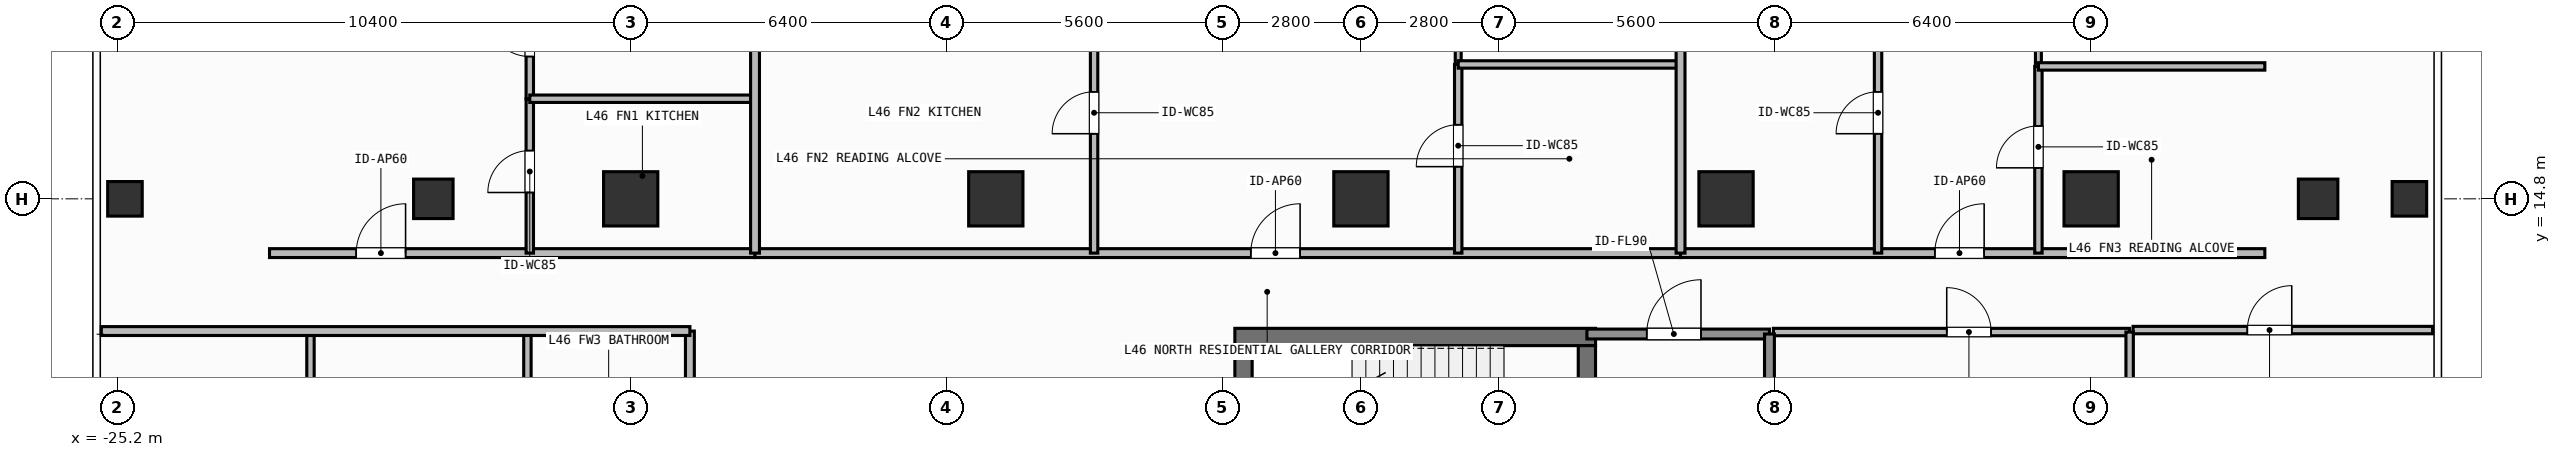
"""IFC4 building model, lengths in metres.
Left out: names, types, materials, properties, quantities, classifications, styles, units other than length and angle.
Written with IfcOpenShell. Run it as: python <this file> out.ifc"""

import sys

from ifc_helpers import new_model, si_unit, direction, frame, frame_2d, origin, origin_2d, place, context, subcontext, project, spatial, rectangle, hollow_rectangle, extrude, element, fill, save


model = new_model("IFC4")
c1 = context("Model", 3, precision=1e-05, world=origin(), true_north=direction((0.0, 1.0)))
c2 = subcontext(c1, "Body", "Model", "MODEL_VIEW")
j1 = project(units=[si_unit("LENGTHUNIT", "METRE"), si_unit("PLANEANGLEUNIT", "RADIAN")], contexts=[c1])
p1 = place(None, origin())
s1 = spatial("IfcSite", under=j1, at=p1, CompositionType="ELEMENT")
p2 = place(p1, origin())
s2 = spatial("IfcBuilding", under=s1, at=p2, CompositionType="ELEMENT")
p3 = place(p2, frame((0.0, 0.0, 187.5)))
s3 = spatial("IfcBuildingStorey", under=s2, at=p3, CompositionType="ELEMENT", Elevation=187.5)
p4 = place(p3, frame((-2.555, 12.0, 0.0), z_axis=(0.0, 0.0, 1.0), x_axis=(1.0, 0.0, 0.0)))
e1 = element("IfcWall", 1, at=p4, inside=s3, PredefinedType="SHEAR", context=c2, shape_type="SweptSolid", body=[
    extrude(rectangle(XDim=7.31, YDim=0.35, at=frame_2d((3.655, 0.0))), origin(), (0.0, 0.0, 1.0), 3.9),
])
p5 = place(p3, frame((-2.38, 8.9, 0.0), z_axis=(0.0, 0.0, 1.0), x_axis=(0.0, 1.0, 0.0)))
e2 = element("IfcWall", 2, at=p5, inside=s3, PredefinedType="SHEAR", context=c2, shape_type="SweptSolid", body=[
    extrude(rectangle(XDim=2.925, YDim=0.35, at=frame_2d((1.462, 0.0))), origin(), (0.0, 0.0, 1.0), 3.9),
])
p6 = place(p3, frame((4.58, 11.825, 0.0), z_axis=(0.0, 0.0, 1.0), x_axis=(0.0, -1.0, 0.0)))
e3 = element("IfcWall", 3, at=p6, inside=s3, PredefinedType="SHEAR", context=c2, shape_type="SweptSolid", body=[
    extrude(rectangle(XDim=2.925, YDim=0.35, at=frame_2d((1.462, 0.0))), origin(), (0.0, 0.0, 1.0), 3.9),
])
p7 = place(p6, frame((0.913, 0.0, 0.0)))
e4 = element("IfcOpeningElement", 4, at=p7, cuts=e3, PredefinedType="OPENING", context=c2, shape_type="SweptSolid", body=[
    extrude(rectangle(XDim=1.1, YDim=2.15, at=frame_2d((0.55, 1.075))), frame((0.0, 0.185, 0.0), z_axis=(0.0, -1.0, 0.0), x_axis=(1.0, 0.0, 0.0)), (0.0, 0.0, 1.0), 0.37),
])
for number, where, z_axis, x_axis in (
    (5, (-14.8, 14.8, 0.0), (0.0, 0.0, 1.0), (1.0, 0.0, 0.0)),
    (6, (-7.4, 14.8, 0.0), (0.0, 0.0, 1.0), (1.0, 0.0, 0.0)),
    (7, (0.0, 14.8, 0.0), (0.0, 0.0, 1.0), (1.0, 0.0, 0.0)),
    (8, (7.4, 14.8, 0.0), (0.0, 0.0, 1.0), (1.0, 0.0, 0.0)),
    (9, (14.8, 14.8, 0.0), (0.0, 0.0, 1.0), (1.0, 0.0, 0.0)),
):
    element("IfcColumn", number, at=place(p3, frame(where, z_axis=z_axis, x_axis=x_axis)), inside=s3, PredefinedType="COLUMN", context=c2, shape_type="SweptSolid", body=[
        extrude(rectangle(XDim=1.1, YDim=1.1, at=origin_2d()), origin(), (0.0, 0.0, 1.0), 3.9),
    ])
for number, where, z_axis, x_axis in (
    (10, (-18.8, 14.8, 0.0), (0.0, 0.0, 1.0), (1.0, 0.0, 0.0)),
    (11, (19.4, 14.8, 0.0), (0.0, 0.0, 1.0), (1.0, 0.0, 0.0)),
):
    element("IfcColumn", number, at=place(p3, frame(where, z_axis=z_axis, x_axis=x_axis)), inside=s3, PredefinedType="COLUMN", context=c2, shape_type="SweptSolid", body=[
        extrude(hollow_rectangle(XDim=0.8, YDim=0.8, WallThickness=0.036, at=origin_2d()), origin(), (0.0, 0.0, 1.0), 3.9),
    ])
for number, where, z_axis, x_axis in (
    (12, (-25.05, 14.8, 0.0), (0.0, 0.0, 1.0), (1.0, 0.0, 0.0)),
    (13, (21.25, 14.8, 0.0), (0.0, 0.0, 1.0), (1.0, 0.0, 0.0)),
):
    element("IfcColumn", number, at=place(p3, frame(where, z_axis=z_axis, x_axis=x_axis)), inside=s3, PredefinedType="COLUMN", context=c2, shape_type="SweptSolid", body=[
        extrude(hollow_rectangle(XDim=0.7, YDim=0.7, WallThickness=0.032, at=origin_2d()), origin(), (0.0, 0.0, 1.0), 3.9),
    ])
p8 = place(p3, frame((4.58, 12.06, 0.0), z_axis=(0.0, 0.0, 1.0), x_axis=(1.0, 0.0, 0.0)))
e14 = element("IfcWall", 14, at=p8, inside=s3, PredefinedType="SOLIDWALL", context=c2, shape_type="SweptSolid", body=[
    extrude(rectangle(XDim=3.7, YDim=0.2, at=frame_2d((1.85, 0.0))), origin(), (0.0, 0.0, 1.0), 3.62),
])
p9 = place(p8, frame((1.212, 0.0, 0.0)))
e15 = element("IfcOpeningElement", 15, at=p9, cuts=e14, PredefinedType="OPENING", context=c2, shape_type="SweptSolid", body=[
    extrude(rectangle(XDim=1.1, YDim=2.15, at=frame_2d((0.55, 1.075))), frame((0.0, 0.11, 0.0), z_axis=(0.0, -1.0, 0.0), x_axis=(1.0, 0.0, 0.0)), (0.0, 0.0, 1.0), 0.22),
])
p10 = place(p3, frame((8.36, 12.1, 0.0), z_axis=(0.0, 0.0, 1.0), x_axis=(1.0, 0.0, 0.0)))
e16 = element("IfcWall", 16, at=p10, inside=s3, PredefinedType="PARTITIONING", context=c2, shape_type="SweptSolid", body=[
    extrude(rectangle(XDim=7.22, YDim=0.15, at=frame_2d((3.61, 0.0))), origin(), (0.0, 0.0, 1.0), 3.62),
])
p11 = place(p10, frame((3.513, 0.0, 0.0)))
e17 = element("IfcOpeningElement", 17, at=p11, cuts=e16, PredefinedType="OPENING", context=c2, shape_type="SweptSolid", body=[
    extrude(rectangle(XDim=0.9, YDim=2.1, at=frame_2d((0.45, 1.05))), frame((0.0, 0.085, 0.0), z_axis=(0.0, -1.0, 0.0), x_axis=(1.0, 0.0, 0.0)), (0.0, 0.0, 1.0), 0.17),
])
p12 = place(p3, frame((-22.12, 13.7, 0.0), z_axis=(0.0, 0.0, 1.0), x_axis=(1.0, 0.0, 0.0)))
e18 = element("IfcWall", 18, at=p12, inside=s3, PredefinedType="PARTITIONING", context=c2, shape_type="SweptSolid", body=[
    extrude(rectangle(XDim=9.84, YDim=0.18, at=frame_2d((4.92, 0.0))), origin(), (0.0, 0.0, 1.0), 3.62),
])
p13 = place(p12, frame((1.758, 0.0, 0.0)))
e19 = element("IfcOpeningElement", 19, at=p13, cuts=e18, PredefinedType="OPENING", context=c2, shape_type="SweptSolid", body=[
    extrude(rectangle(XDim=1.0, YDim=2.2, at=frame_2d((0.5, 1.1))), frame((0.0, 0.1, 0.0), z_axis=(0.0, -1.0, 0.0), x_axis=(1.0, 0.0, 0.0)), (0.0, 0.0, 1.0), 0.2),
])
p14 = place(p3, frame((-16.845, 13.7, 0.0), z_axis=(0.0, 0.0, 1.0), x_axis=(0.0, 1.0, 0.0)))
e20 = element("IfcWall", 20, at=p14, inside=s3, PredefinedType="PARTITIONING", context=c2, shape_type="SweptSolid", body=[
    extrude(rectangle(XDim=3.129, YDim=0.15, at=frame_2d((1.564, 0.0))), origin(), (0.0, 0.0, 1.0), 3.62),
])
p15 = place(p14, frame((1.229, 0.0, 0.0)))
e21 = element("IfcOpeningElement", 21, at=p15, cuts=e20, PredefinedType="OPENING", context=c2, shape_type="SweptSolid", body=[
    extrude(rectangle(XDim=0.85, YDim=2.1, at=frame_2d((0.425, 1.05))), frame((0.0, 0.085, 0.0), z_axis=(0.0, -1.0, 0.0), x_axis=(1.0, 0.0, 0.0)), (0.0, 0.0, 1.0), 0.17),
])
p16 = place(p3, frame((-16.845, 16.829, 0.0), z_axis=(0.0, 0.0, 1.0), x_axis=(0.0, 1.0, 0.0)))
e22 = element("IfcWall", 22, at=p16, inside=s3, PredefinedType="PARTITIONING", context=c2, shape_type="SweptSolid", body=[
    extrude(rectangle(XDim=2.561, YDim=0.15, at=frame_2d((1.28, 0.0))), origin(), (0.0, 0.0, 1.0), 3.62),
])
p17 = place(p16, frame((0.855, 0.0, 0.0)))
e23 = element("IfcOpeningElement", 23, at=p17, cuts=e22, PredefinedType="OPENING", context=c2, shape_type="SweptSolid", body=[
    extrude(rectangle(XDim=0.85, YDim=2.1, at=frame_2d((0.425, 1.05))), frame((0.0, 0.085, 0.0), z_axis=(0.0, -1.0, 0.0), x_axis=(1.0, 0.0, 0.0)), (0.0, 0.0, 1.0), 0.17),
])
p18 = place(p3, frame((-12.28, 13.7, 0.0), z_axis=(0.0, 0.0, 1.0), x_axis=(1.0, 0.0, 0.0)))
e24 = element("IfcWall", 24, at=p18, inside=s3, PredefinedType="PARTITIONING", context=c2, shape_type="SweptSolid", body=[
    extrude(rectangle(XDim=18.758, YDim=0.18, at=frame_2d((9.379, 0.0))), origin(), (0.0, 0.0, 1.0), 3.62),
])
p19 = place(p18, frame((10.048, 0.0, 0.0)))
e25 = element("IfcOpeningElement", 25, at=p19, cuts=e24, PredefinedType="OPENING", context=c2, shape_type="SweptSolid", body=[
    extrude(rectangle(XDim=1.0, YDim=2.2, at=frame_2d((0.5, 1.1))), frame((0.0, 0.1, 0.0), z_axis=(0.0, -1.0, 0.0), x_axis=(1.0, 0.0, 0.0)), (0.0, 0.0, 1.0), 0.2),
])
p20 = place(p3, frame((-5.408, 13.7, 0.0), z_axis=(0.0, 0.0, 1.0), x_axis=(0.0, 1.0, 0.0)))
e26 = element("IfcWall", 26, at=p20, inside=s3, PredefinedType="PARTITIONING", context=c2, shape_type="SweptSolid", body=[
    extrude(rectangle(XDim=5.69, YDim=0.15, at=frame_2d((2.845, 0.0))), origin(), (0.0, 0.0, 1.0), 3.62),
])
p21 = place(p20, frame((2.42, 0.0, 0.0)))
e27 = element("IfcOpeningElement", 27, at=p21, cuts=e26, PredefinedType="OPENING", context=c2, shape_type="SweptSolid", body=[
    extrude(rectangle(XDim=0.85, YDim=2.1, at=frame_2d((0.425, 1.05))), frame((0.0, 0.085, 0.0), z_axis=(0.0, -1.0, 0.0), x_axis=(1.0, 0.0, 0.0)), (0.0, 0.0, 1.0), 0.17),
])
p22 = place(p3, frame((1.972, 13.7, 0.0), z_axis=(0.0, 0.0, 1.0), x_axis=(0.0, 1.0, 0.0)))
e28 = element("IfcWall", 28, at=p22, inside=s3, PredefinedType="PARTITIONING", context=c2, shape_type="SweptSolid", body=[
    extrude(rectangle(XDim=3.824, YDim=0.15, at=frame_2d((1.912, 0.0))), origin(), (0.0, 0.0, 1.0), 3.62),
])
p23 = place(p22, frame((1.752, 0.0, 0.0)))
e29 = element("IfcOpeningElement", 29, at=p23, cuts=e28, PredefinedType="OPENING", context=c2, shape_type="SweptSolid", body=[
    extrude(rectangle(XDim=0.85, YDim=2.1, at=frame_2d((0.425, 1.05))), frame((0.0, 0.085, 0.0), z_axis=(0.0, -1.0, 0.0), x_axis=(1.0, 0.0, 0.0)), (0.0, 0.0, 1.0), 0.17),
])
p24 = place(p3, frame((1.972, 17.524, 0.0), z_axis=(0.0, 0.0, 1.0), x_axis=(0.0, 1.0, 0.0)))
e30 = element("IfcWall", 30, at=p24, inside=s3, PredefinedType="PARTITIONING", context=c2, shape_type="SweptSolid", body=[
    extrude(rectangle(XDim=1.866, YDim=0.12, at=frame_2d((0.933, 0.0))), origin(), (0.0, 0.0, 1.0), 3.62),
])
p25 = place(p24, frame((0.508, 0.0, 0.0)))
e31 = element("IfcOpeningElement", 31, at=p25, cuts=e30, PredefinedType="OPENING", context=c2, shape_type="SweptSolid", body=[
    extrude(rectangle(XDim=0.85, YDim=2.1, at=frame_2d((0.425, 1.05))), frame((0.0, 0.07, 0.0), z_axis=(0.0, -1.0, 0.0), x_axis=(1.0, 0.0, 0.0)), (0.0, 0.0, 1.0), 0.14),
])
p26 = place(p3, frame((6.478, 13.7, 0.0), z_axis=(0.0, 0.0, 1.0), x_axis=(1.0, 0.0, 0.0)))
e32 = element("IfcWall", 32, at=p26, inside=s3, PredefinedType="PARTITIONING", context=c2, shape_type="SweptSolid", body=[
    extrude(rectangle(XDim=11.842, YDim=0.18, at=frame_2d((5.921, 0.0))), origin(), (0.0, 0.0, 1.0), 3.62),
])
p27 = place(p26, frame((5.154, 0.0, 0.0)))
e33 = element("IfcOpeningElement", 33, at=p27, cuts=e32, PredefinedType="OPENING", context=c2, shape_type="SweptSolid", body=[
    extrude(rectangle(XDim=1.0, YDim=2.2, at=frame_2d((0.5, 1.1))), frame((0.0, 0.1, 0.0), z_axis=(0.0, -1.0, 0.0), x_axis=(1.0, 0.0, 0.0)), (0.0, 0.0, 1.0), 0.2),
])
p28 = place(p3, frame((10.481, 13.7, 0.0), z_axis=(0.0, 0.0, 1.0), x_axis=(0.0, 1.0, 0.0)))
e34 = element("IfcWall", 34, at=p28, inside=s3, PredefinedType="PARTITIONING", context=c2, shape_type="SweptSolid", body=[
    extrude(rectangle(XDim=5.69, YDim=0.15, at=frame_2d((2.845, 0.0))), origin(), (0.0, 0.0, 1.0), 3.62),
])
p29 = place(p28, frame((2.42, 0.0, 0.0)))
e35 = element("IfcOpeningElement", 35, at=p29, cuts=e34, PredefinedType="OPENING", context=c2, shape_type="SweptSolid", body=[
    extrude(rectangle(XDim=0.85, YDim=2.1, at=frame_2d((0.425, 1.05))), frame((0.0, 0.085, 0.0), z_axis=(0.0, -1.0, 0.0), x_axis=(1.0, 0.0, 0.0)), (0.0, 0.0, 1.0), 0.17),
])
p30 = place(p3, frame((13.731, 13.7, 0.0), z_axis=(0.0, 0.0, 1.0), x_axis=(0.0, 1.0, 0.0)))
e36 = element("IfcWall", 36, at=p30, inside=s3, PredefinedType="PARTITIONING", context=c2, shape_type="SweptSolid", body=[
    extrude(rectangle(XDim=3.784, YDim=0.15, at=frame_2d((1.892, 0.0))), origin(), (0.0, 0.0, 1.0), 3.62),
])
p31 = place(p30, frame((1.729, 0.0, 0.0)))
e37 = element("IfcOpeningElement", 37, at=p31, cuts=e36, PredefinedType="OPENING", context=c2, shape_type="SweptSolid", body=[
    extrude(rectangle(XDim=0.85, YDim=2.1, at=frame_2d((0.425, 1.05))), frame((0.0, 0.085, 0.0), z_axis=(0.0, -1.0, 0.0), x_axis=(1.0, 0.0, 0.0)), (0.0, 0.0, 1.0), 0.17),
])
p32 = place(p3, frame((13.731, 17.484, 0.0), z_axis=(0.0, 0.0, 1.0), x_axis=(0.0, 1.0, 0.0)))
e38 = element("IfcWall", 38, at=p32, inside=s3, PredefinedType="PARTITIONING", context=c2, shape_type="SweptSolid", body=[
    extrude(rectangle(XDim=1.906, YDim=0.12, at=frame_2d((0.953, 0.0))), origin(), (0.0, 0.0, 1.0), 3.62),
])
p33 = place(p32, frame((0.602, 0.0, 0.0)))
e39 = element("IfcOpeningElement", 39, at=p33, cuts=e38, PredefinedType="OPENING", context=c2, shape_type="SweptSolid", body=[
    extrude(rectangle(XDim=0.85, YDim=2.1, at=frame_2d((0.425, 1.05))), frame((0.0, 0.07, 0.0), z_axis=(0.0, -1.0, 0.0), x_axis=(1.0, 0.0, 0.0)), (0.0, 0.0, 1.0), 0.14),
])
p34 = place(p3, frame((-13.6, 4.04, 0.0), z_axis=(0.0, 0.0, 1.0), x_axis=(0.0, 1.0, 0.0)))
e40 = element("IfcWall", 40, at=p34, inside=s3, PredefinedType="PARTITIONING", context=c2, shape_type="SweptSolid", body=[
    extrude(rectangle(XDim=8.08, YDim=0.18, at=frame_2d((4.04, 0.0))), origin(), (0.0, 0.0, 1.0), 3.62),
])
p35 = place(p34, frame((1.761, 0.0, 0.0)))
e41 = element("IfcOpeningElement", 41, at=p35, cuts=e40, PredefinedType="OPENING", context=c2, shape_type="SweptSolid", body=[
    extrude(rectangle(XDim=1.0, YDim=2.2, at=frame_2d((0.5, 1.1))), frame((0.0, 0.1, 0.0), z_axis=(0.0, -1.0, 0.0), x_axis=(1.0, 0.0, 0.0)), (0.0, 0.0, 1.0), 0.2),
])
p36 = place(p3, frame((15.65, 12.14, 0.0), z_axis=(0.0, 0.0, 1.0), x_axis=(1.0, 0.0, 0.0)))
e42 = element("IfcWall", 42, at=p36, inside=s3, PredefinedType="PARTITIONING", context=c2, shape_type="SweptSolid", body=[
    extrude(rectangle(XDim=6.07, YDim=0.15, at=frame_2d((3.035, 0.0))), origin(), (0.0, 0.0, 1.0), 3.62),
])
p37 = place(p36, frame((2.316, 0.0, 0.0)))
e43 = element("IfcOpeningElement", 43, at=p37, cuts=e42, PredefinedType="OPENING", context=c2, shape_type="SweptSolid", body=[
    extrude(rectangle(XDim=0.9, YDim=2.1, at=frame_2d((0.45, 1.05))), frame((0.0, 0.085, 0.0), z_axis=(0.0, -1.0, 0.0), x_axis=(1.0, 0.0, 0.0)), (0.0, 0.0, 1.0), 0.17),
])
p38 = place(p3, frame((8.28, 8.8, 0.0), z_axis=(0.0, 0.0, 1.0), x_axis=(0.0, 1.0, 0.0)))
e44 = element("IfcWall", 44, at=p38, inside=s3, PredefinedType="SOLIDWALL", context=c2, shape_type="SweptSolid", body=[
    extrude(rectangle(XDim=3.26, YDim=0.2, at=frame_2d((1.63, 0.0))), origin(), (0.0, 0.0, 1.0), 3.62),
])
p39 = place(p3, frame((15.58, 5.85, 0.0), z_axis=(0.0, 0.0, 1.0), x_axis=(0.0, 1.0, 0.0)))
e45 = element("IfcWall", 45, at=p39, inside=s3, PredefinedType="PARTITIONING", context=c2, shape_type="SweptSolid", body=[
    extrude(rectangle(XDim=6.25, YDim=0.15, at=frame_2d((3.125, 0.0))), origin(), (0.0, 0.0, 1.0), 3.62),
])
p40 = place(p3, frame((-16.845, 16.829, 0.0), z_axis=(0.0, 0.0, 1.0), x_axis=(1.0, 0.0, 0.0)))
e46 = element("IfcWall", 46, at=p40, inside=s3, PredefinedType="PARTITIONING", context=c2, shape_type="SweptSolid", body=[
    extrude(rectangle(XDim=4.565, YDim=0.15, at=frame_2d((2.282, 0.0))), origin(), (0.0, 0.0, 1.0), 3.62),
])
p41 = place(p3, frame((1.972, 17.524, 0.0), z_axis=(0.0, 0.0, 1.0), x_axis=(1.0, 0.0, 0.0)))
e47 = element("IfcWall", 47, at=p41, inside=s3, PredefinedType="PARTITIONING", context=c2, shape_type="SweptSolid", body=[
    extrude(rectangle(XDim=4.506, YDim=0.15, at=frame_2d((2.253, 0.0))), origin(), (0.0, 0.0, 1.0), 3.62),
])
p42 = place(p3, frame((-12.28, 13.7, 0.0), z_axis=(0.0, 0.0, 1.0), x_axis=(0.0, 1.0, 0.0)))
e48 = element("IfcWall", 48, at=p42, inside=s3, PredefinedType="PARTITIONING", context=c2, shape_type="SweptSolid", body=[
    extrude(rectangle(XDim=9.93, YDim=0.18, at=frame_2d((4.965, 0.0))), origin(), (0.0, 0.0, 1.0), 3.62),
])
p43 = place(p3, frame((13.731, 17.484, 0.0), z_axis=(0.0, 0.0, 1.0), x_axis=(1.0, 0.0, 0.0)))
e49 = element("IfcWall", 49, at=p43, inside=s3, PredefinedType="PARTITIONING", context=c2, shape_type="SweptSolid", body=[
    extrude(rectangle(XDim=4.589, YDim=0.15, at=frame_2d((2.294, 0.0))), origin(), (0.0, 0.0, 1.0), 3.62),
])
p44 = place(p3, frame((6.478, 13.7, 0.0), z_axis=(0.0, 0.0, 1.0), x_axis=(0.0, 1.0, 0.0)))
e50 = element("IfcWall", 50, at=p44, inside=s3, PredefinedType="PARTITIONING", context=c2, shape_type="SweptSolid", body=[
    extrude(rectangle(XDim=9.93, YDim=0.18, at=frame_2d((4.965, 0.0))), origin(), (0.0, 0.0, 1.0), 3.62),
])
for number, where, z_axis, x_axis in (
    (51, (-16.893, 9.32, 0.0), (0.0, 0.0, 1.0), (0.0, 1.0, 0.0)),
    (52, (-21.29, 9.32, 0.0), (0.0, 0.0, 1.0), (0.0, 1.0, 0.0)),
):
    element("IfcWall", number, at=place(p3, frame(where, z_axis=z_axis, x_axis=x_axis)), inside=s3, PredefinedType="PARTITIONING", context=c2, shape_type="SweptSolid", body=[
        extrude(rectangle(XDim=2.8, YDim=0.15, at=frame_2d((1.4, 0.0))), origin(), (0.0, 0.0, 1.0), 3.62),
    ])
p45 = place(p3, frame((-25.53, 12.12, 0.0), z_axis=(0.0, 0.0, 1.0), x_axis=(1.0, 0.0, 0.0)))
e53 = element("IfcWall", 53, at=p45, inside=s3, PredefinedType="PARTITIONING", context=c2, shape_type="SweptSolid", body=[
    extrude(rectangle(XDim=11.93, YDim=0.18, at=frame_2d((5.965, 0.0))), origin(), (0.0, 0.0, 1.0), 3.62),
])
p46 = place(p9, origin())
e54 = element("IfcDoor", 54, at=p46, inside=s3, OperationType="SINGLE_SWING_RIGHT", PredefinedType="DOOR", context=c2, shape_type="SweptSolid", body=[
    extrude(rectangle(XDim=1.1, YDim=2.15, at=frame_2d((0.55, 1.075))), frame((0.0, 0.025, 0.0), z_axis=(0.0, -1.0, 0.0), x_axis=(1.0, 0.0, 0.0)), (0.0, 0.0, 1.0), 0.05),
])
fill(e15, e54)
p47 = place(p11, origin())
e55 = element("IfcDoor", 55, at=p47, inside=s3, OperationType="SINGLE_SWING_LEFT", PredefinedType="DOOR", context=c2, shape_type="SweptSolid", body=[
    extrude(rectangle(XDim=0.9, YDim=2.1, at=frame_2d((0.45, 1.05))), frame((0.0, 0.025, 0.0), z_axis=(0.0, -1.0, 0.0), x_axis=(1.0, 0.0, 0.0)), (0.0, 0.0, 1.0), 0.05),
])
fill(e17, e55)
p48 = place(p13, origin())
e56 = element("IfcDoor", 56, at=p48, inside=s3, OperationType="SINGLE_SWING_RIGHT", PredefinedType="DOOR", context=c2, shape_type="SweptSolid", body=[
    extrude(rectangle(XDim=1.0, YDim=2.2, at=frame_2d((0.5, 1.1))), frame((0.0, 0.025, 0.0), z_axis=(0.0, -1.0, 0.0), x_axis=(1.0, 0.0, 0.0)), (0.0, 0.0, 1.0), 0.05),
])
fill(e19, e56)
p49 = place(p15, origin())
e57 = element("IfcDoor", 57, at=p49, inside=s3, OperationType="SINGLE_SWING_LEFT", PredefinedType="DOOR", context=c2, shape_type="SweptSolid", body=[
    extrude(rectangle(XDim=0.85, YDim=2.1, at=frame_2d((0.425, 1.05))), frame((0.0, 0.025, 0.0), z_axis=(0.0, -1.0, 0.0), x_axis=(1.0, 0.0, 0.0)), (0.0, 0.0, 1.0), 0.05),
])
fill(e21, e57)
p50 = place(p17, origin())
e58 = element("IfcDoor", 58, at=p50, inside=s3, OperationType="SINGLE_SWING_RIGHT", PredefinedType="DOOR", context=c2, shape_type="SweptSolid", body=[
    extrude(rectangle(XDim=0.85, YDim=2.1, at=frame_2d((0.425, 1.05))), frame((0.0, 0.025, 0.0), z_axis=(0.0, -1.0, 0.0), x_axis=(1.0, 0.0, 0.0)), (0.0, 0.0, 1.0), 0.05),
])
fill(e23, e58)
p51 = place(p19, origin())
e59 = element("IfcDoor", 59, at=p51, inside=s3, OperationType="SINGLE_SWING_RIGHT", PredefinedType="DOOR", context=c2, shape_type="SweptSolid", body=[
    extrude(rectangle(XDim=1.0, YDim=2.2, at=frame_2d((0.5, 1.1))), frame((0.0, 0.025, 0.0), z_axis=(0.0, -1.0, 0.0), x_axis=(1.0, 0.0, 0.0)), (0.0, 0.0, 1.0), 0.05),
])
fill(e25, e59)
p52 = place(p21, origin())
e60 = element("IfcDoor", 60, at=p52, inside=s3, OperationType="SINGLE_SWING_LEFT", PredefinedType="DOOR", context=c2, shape_type="SweptSolid", body=[
    extrude(rectangle(XDim=0.85, YDim=2.1, at=frame_2d((0.425, 1.05))), frame((0.0, 0.025, 0.0), z_axis=(0.0, -1.0, 0.0), x_axis=(1.0, 0.0, 0.0)), (0.0, 0.0, 1.0), 0.05),
])
fill(e27, e60)
p53 = place(p23, origin())
e61 = element("IfcDoor", 61, at=p53, inside=s3, OperationType="SINGLE_SWING_LEFT", PredefinedType="DOOR", context=c2, shape_type="SweptSolid", body=[
    extrude(rectangle(XDim=0.85, YDim=2.1, at=frame_2d((0.425, 1.05))), frame((0.0, 0.025, 0.0), z_axis=(0.0, -1.0, 0.0), x_axis=(1.0, 0.0, 0.0)), (0.0, 0.0, 1.0), 0.05),
])
fill(e29, e61)
p54 = place(p27, origin())
e62 = element("IfcDoor", 62, at=p54, inside=s3, OperationType="SINGLE_SWING_RIGHT", PredefinedType="DOOR", context=c2, shape_type="SweptSolid", body=[
    extrude(rectangle(XDim=1.0, YDim=2.2, at=frame_2d((0.5, 1.1))), frame((0.0, 0.025, 0.0), z_axis=(0.0, -1.0, 0.0), x_axis=(1.0, 0.0, 0.0)), (0.0, 0.0, 1.0), 0.05),
])
fill(e33, e62)
p55 = place(p29, origin())
e63 = element("IfcDoor", 63, at=p55, inside=s3, OperationType="SINGLE_SWING_LEFT", PredefinedType="DOOR", context=c2, shape_type="SweptSolid", body=[
    extrude(rectangle(XDim=0.85, YDim=2.1, at=frame_2d((0.425, 1.05))), frame((0.0, 0.025, 0.0), z_axis=(0.0, -1.0, 0.0), x_axis=(1.0, 0.0, 0.0)), (0.0, 0.0, 1.0), 0.05),
])
fill(e35, e63)
p56 = place(p31, origin())
e64 = element("IfcDoor", 64, at=p56, inside=s3, OperationType="SINGLE_SWING_LEFT", PredefinedType="DOOR", context=c2, shape_type="SweptSolid", body=[
    extrude(rectangle(XDim=0.85, YDim=2.1, at=frame_2d((0.425, 1.05))), frame((0.0, 0.025, 0.0), z_axis=(0.0, -1.0, 0.0), x_axis=(1.0, 0.0, 0.0)), (0.0, 0.0, 1.0), 0.05),
])
fill(e37, e64)
p57 = place(p37, origin())
e65 = element("IfcDoor", 65, at=p57, inside=s3, OperationType="SINGLE_SWING_RIGHT", PredefinedType="DOOR", context=c2, shape_type="SweptSolid", body=[
    extrude(rectangle(XDim=0.9, YDim=2.1, at=frame_2d((0.45, 1.05))), frame((0.0, 0.025, 0.0), z_axis=(0.0, -1.0, 0.0), x_axis=(1.0, 0.0, 0.0)), (0.0, 0.0, 1.0), 0.05),
])
fill(e43, e65)
save(model, sys.argv[1])
